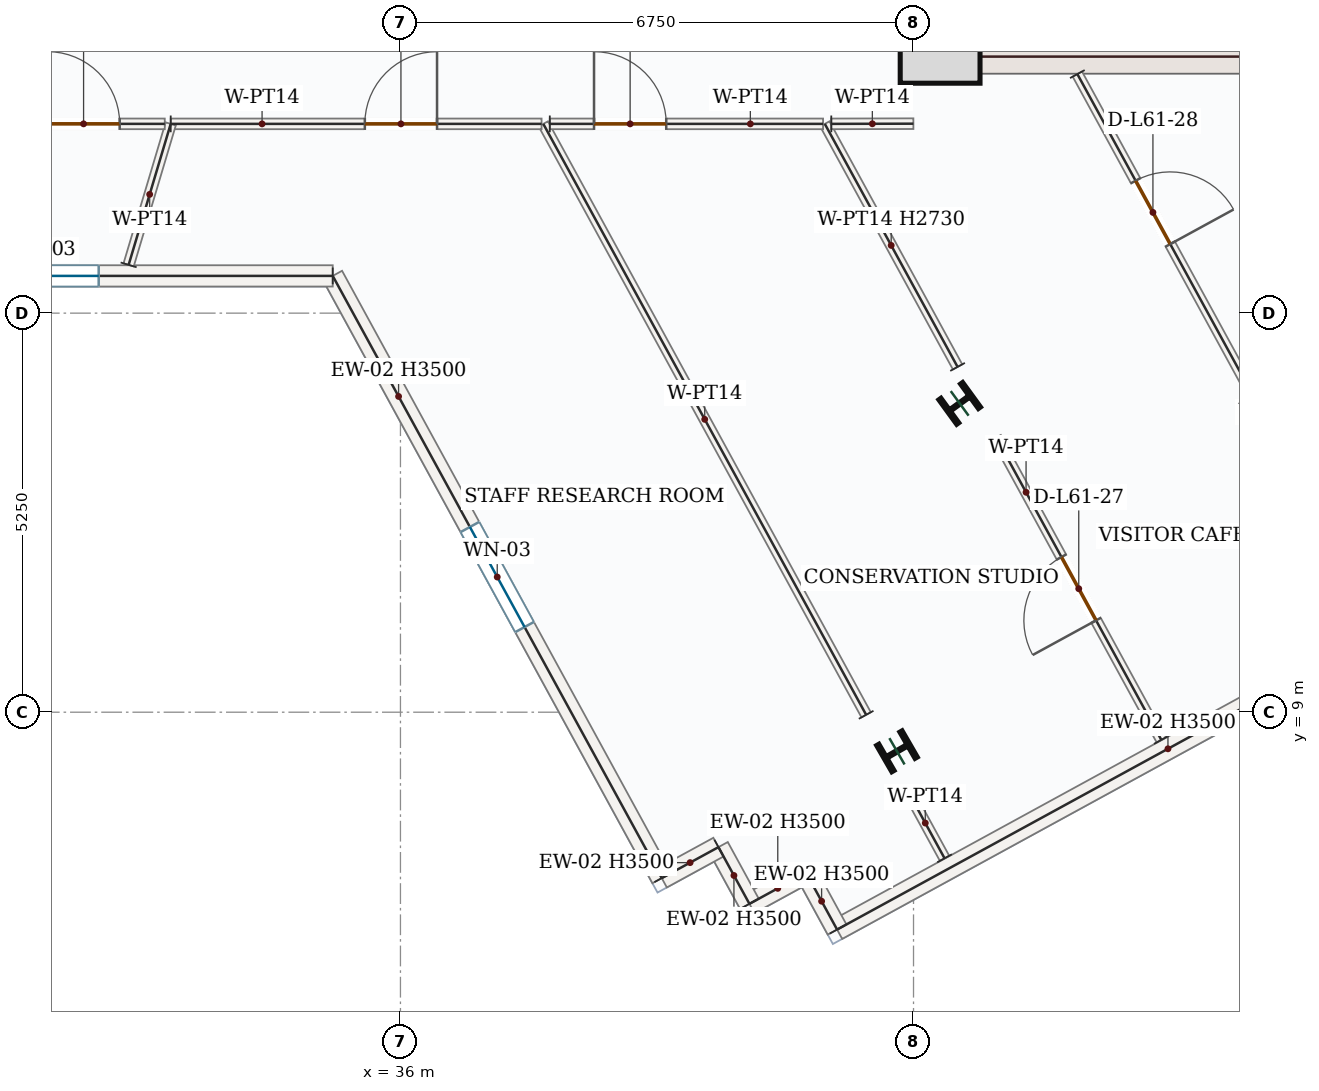
"""IFC4 building model, lengths in metres.
Left out: names, types, materials, properties, quantities, classifications, styles, units other than length and angle.
Written with IfcOpenShell. Run it as: python <this file> out.ifc"""

import sys

from ifc_helpers import new_model, si_unit, direction, frame, frame_2d, origin, origin_2d, place, context, subcontext, project, spatial, rectangle, i_section, extrude, source, transform, mapped, element, fill, save


model = new_model("IFC4")
c1 = context("Model", 3, precision=1e-05, world=origin(), true_north=direction((0.0, 1.0)))
c2 = subcontext(c1, "Body", "Model", "MODEL_VIEW")
j1 = project(units=[si_unit("LENGTHUNIT", "METRE"), si_unit("PLANEANGLEUNIT", "RADIAN")], contexts=[c1])
p1 = place(None, origin())
s1 = spatial("IfcSite", under=j1, at=p1, CompositionType="ELEMENT")
p2 = place(p1, origin())
s2 = spatial("IfcBuilding", under=s1, at=p2, CompositionType="ELEMENT")
p3 = place(p2, frame((0.0, 0.0, 257.85)))
s3 = spatial("IfcBuildingStorey", under=s2, at=p3, CompositionType="ELEMENT", Elevation=257.85)
p4 = place(p3, frame((42.975, 17.4, 0.0), z_axis=(0.0, 0.0, 1.0), x_axis=(0.0, 1.0, 0.0)))
e1 = element("IfcWall", 1, at=p4, inside=s3, PredefinedType="SHEAR", context=c2, shape_type="SweptSolid", body=[
    extrude(rectangle(XDim=8.55, YDim=0.45, at=frame_2d((4.275, 0.0))), origin(), (0.0, 0.0, 1.0), 3.5),
])
p5 = place(p4, frame((6.65, 0.0, 0.0)))
e2 = element("IfcOpeningElement", 2, at=p5, cuts=e1, PredefinedType="OPENING", context=c2, shape_type="SweptSolid", body=[
    extrude(rectangle(XDim=1.1, YDim=2.2, at=frame_2d((0.55, 1.1))), frame((0.0, 0.235, 0.0), z_axis=(0.0, -1.0, 0.0), x_axis=(1.0, 0.0, 0.0)), (0.0, 0.0, 1.0), 0.47),
])
p6 = place(p4, frame((1.75, 0.0, 0.0)))
e3 = element("IfcOpeningElement", 3, at=p6, cuts=e1, PredefinedType="OPENING", context=c2, shape_type="SweptSolid", body=[
    extrude(rectangle(XDim=1.3, YDim=2.2, at=frame_2d((0.65, 1.1))), frame((0.0, 0.235, 0.0), z_axis=(0.0, -1.0, 0.0), x_axis=(1.0, 0.0, 0.0)), (0.0, 0.0, 1.0), 0.47),
])
p7 = place(p4, frame((4.55, 0.0, 0.0)))
e4 = element("IfcOpeningElement", 4, at=p7, cuts=e1, PredefinedType="OPENING", context=c2, shape_type="SweptSolid", body=[
    extrude(rectangle(XDim=0.88, YDim=2.1, at=frame_2d((0.44, 1.05))), frame((0.0, 0.235, 0.0), z_axis=(0.0, -1.0, 0.0), x_axis=(1.0, 0.0, 0.0)), (0.0, 0.0, 1.0), 0.47),
])
m1 = source(origin(), c2, "Body", "SweptSolid", [
    extrude(rectangle(XDim=7.1, YDim=0.45, at=frame_2d((3.55, 0.0))), origin(), (0.0, 0.0, 1.0), 3.5),
])
p8 = place(p3, frame((43.2, 17.625, 0.0), z_axis=(0.0, 0.0, 1.0), x_axis=(1.0, 0.0, 0.0)))
e5 = element("IfcWall", 5, at=p8, inside=s3, PredefinedType="SHEAR", context=c2, shape_type="MappedRepresentation", body=[
    mapped(m1, transform((0.0, 0.0, 0.0), x_axis=(1.0, 0.0, 0.0), y_axis=(0.0, 1.0, 0.0), z_axis=(0.0, 0.0, 1.0), scale=1.0)),
])
m2 = source(origin(), c2, "Body", "SweptSolid", [
    extrude(rectangle(XDim=1.05, YDim=1.05, at=origin_2d()), origin(), (0.0, 0.0, 1.0), 3.75),
])
p9 = place(p3, frame((43.1, 17.8, 0.0), z_axis=(0.0, 0.0, 1.0), x_axis=(1.0, 0.0, 0.0)))
e6 = element("IfcColumn", 6, at=p9, inside=s3, PredefinedType="COLUMN", context=c2, shape_type="MappedRepresentation", body=[
    mapped(m2, transform((0.0, 0.0, 0.0), x_axis=(1.0, 0.0, 0.0), y_axis=(0.0, 1.0, 0.0), z_axis=(0.0, 0.0, 1.0), scale=1.0)),
])
m3 = source(origin(), c2, "Body", "SweptSolid", [
    extrude(i_section(OverallWidth=0.399, OverallDepth=0.386, WebThickness=0.021, FlangeThickness=0.033, FilletRadius=0.018, at=origin_2d()), origin(), (0.0, 0.0, 1.0), 3.75),
])
for number, where, z_axis, x_axis in (
    (7, (43.357, 13.063, 0.0), (0.0, 0.0, 1.0), (-0.588, 0.809, 0.0)),
    (8, (42.532, 8.486, 0.0), (0.0, 0.0, 1.0), (-0.5, 0.866, 0.0)),
):
    element("IfcColumn", number, at=place(p3, frame(where, z_axis=z_axis, x_axis=x_axis)), inside=s3, PredefinedType="COLUMN", context=c2, shape_type="MappedRepresentation", body=[
        mapped(m3, transform((0.0, 0.0, 0.0), x_axis=(1.0, 0.0, 0.0), y_axis=(0.0, 1.0, 0.0), z_axis=(0.0, 0.0, 1.0), scale=1.0)),
    ])
m4 = source(origin(), c2, "Body", "SweptSolid", [
    extrude(rectangle(XDim=9.92, YDim=0.28, at=frame_2d((4.96, 0.0))), origin(), (0.0, 0.0, 1.0), 3.5),
])
p10 = place(p3, frame((50.45, 10.896, 0.0), z_axis=(0.0, 0.0, 1.0), x_axis=(-0.877572768104, -0.479443465574, 0.0)))
e9 = element("IfcWall", 9, at=p10, inside=s3, PredefinedType="SOLIDWALL", context=c2, shape_type="MappedRepresentation", body=[
    mapped(m4, transform((0.0, 0.0, 0.0), x_axis=(1.0, 0.0, 0.0), y_axis=(0.0, 1.0, 0.0), z_axis=(0.0, 0.0, 1.0), scale=1.0)),
])
m5 = source(origin(), c2, "Body", "SweptSolid", [
    extrude(rectangle(XDim=0.85, YDim=0.28, at=frame_2d((0.425, 0.0))), origin(), (0.0, 0.0, 1.0), 3.5),
])
for number, where, z_axis, x_axis in (
    (10, (41.745, 6.14, 0.0), (0.0, 0.0, 1.0), (-0.479, 0.878, 0.0)),
    (11, (41.337, 6.886, 0.0), (0.0, 0.0, 1.0), (-0.878, -0.479, 0.0)),
):
    element("IfcWall", number, at=place(p3, frame(where, z_axis=z_axis, x_axis=x_axis)), inside=s3, PredefinedType="SOLIDWALL", context=c2, shape_type="MappedRepresentation", body=[
        mapped(m5, transform((0.0, 0.0, 0.0), x_axis=(1.0, 0.0, 0.0), y_axis=(0.0, 1.0, 0.0), z_axis=(0.0, 0.0, 1.0), scale=1.0)),
    ])
m6 = source(origin(), c2, "Body", "SweptSolid", [
    extrude(rectangle(XDim=0.85, YDim=0.28, at=frame_2d((0.425, 0.0))), origin(), (0.0, 0.0, 1.0), 3.5),
])
p11 = place(p3, frame((40.591, 6.479, 0.0), z_axis=(0.0, 0.0, 1.0), x_axis=(-0.479656876283, 0.877456141943, 0.0)))
e12 = element("IfcWall", 12, at=p11, inside=s3, PredefinedType="SOLIDWALL", context=c2, shape_type="MappedRepresentation", body=[
    mapped(m6, transform((0.0, 0.0, 0.0), x_axis=(1.0, 0.0, 0.0), y_axis=(0.0, 1.0, 0.0), z_axis=(0.0, 0.0, 1.0), scale=1.0)),
])
p12 = place(p3, frame((40.184, 7.225, 0.0), z_axis=(0.0, 0.0, 1.0), x_axis=(-0.877577015132, -0.479435691737, 0.0)))
e13 = element("IfcWall", 13, at=p12, inside=s3, PredefinedType="SOLIDWALL", context=c2, shape_type="MappedRepresentation", body=[
    mapped(m5, transform((0.0, 0.0, 0.0), x_axis=(1.0, 0.0, 0.0), y_axis=(0.0, 1.0, 0.0), z_axis=(0.0, 0.0, 1.0), scale=1.0)),
])
p13 = place(p3, frame((39.438, 6.817, 0.0), z_axis=(0.0, 0.0, 1.0), x_axis=(-0.479475345647, 0.877555350344, 0.0)))
e14 = element("IfcWall", 14, at=p13, inside=s3, PredefinedType="SOLIDWALL", context=c2, shape_type="SweptSolid", body=[
    extrude(rectangle(XDim=9.028, YDim=0.28, at=frame_2d((4.514, 0.0))), origin(), (0.0, 0.0, 1.0), 3.5),
])
p14 = place(p13, frame((3.764, 0.0, 0.85)))
e15 = element("IfcOpeningElement", 15, at=p14, cuts=e14, PredefinedType="OPENING", context=c2, shape_type="SweptSolid", body=[
    extrude(rectangle(XDim=1.5, YDim=1.5, at=frame_2d((0.75, 0.75))), frame((0.0, 0.15, 0.0), z_axis=(0.0, -1.0, 0.0), x_axis=(1.0, 0.0, 0.0)), (0.0, 0.0, 1.0), 0.3),
])
p15 = place(p3, frame((35.109, 14.74, 0.0), z_axis=(0.0, 0.0, 1.0), x_axis=(-1.0, 0.0, 0.0)))
e16 = element("IfcWall", 16, at=p15, inside=s3, PredefinedType="SOLIDWALL", context=c2, shape_type="SweptSolid", body=[
    extrude(rectangle(XDim=7.658, YDim=0.28, at=frame_2d((3.829, 0.0))), origin(), (0.0, 0.0, 1.0), 2.772),
])
p16 = place(p15, frame((3.079, 0.0, 0.85)))
e17 = element("IfcOpeningElement", 17, at=p16, cuts=e16, PredefinedType="OPENING", context=c2, shape_type="SweptSolid", body=[
    extrude(rectangle(XDim=1.5, YDim=1.5, at=frame_2d((0.75, 0.75))), frame((0.0, 0.15, 0.0), z_axis=(0.0, -1.0, 0.0), x_axis=(1.0, 0.0, 0.0)), (0.0, 0.0, 1.0), 0.3),
])
p17 = place(p3, frame((44.906, 17.395, 0.0), z_axis=(0.0, 0.0, 1.0), x_axis=(0.479449534835, -0.877569452264, 0.0)))
e18 = element("IfcWall", 18, at=p17, inside=s3, PredefinedType="PARTITIONING", context=c2, shape_type="SweptSolid", body=[
    extrude(rectangle(XDim=8.216, YDim=0.14, at=frame_2d((4.108, 0.0))), origin(), (0.0, 0.0, 1.0), 3.5),
])
p18 = place(p17, frame((1.599, 0.0, 0.0)))
e19 = element("IfcOpeningElement", 19, at=p18, cuts=e18, PredefinedType="OPENING", context=c2, shape_type="SweptSolid", body=[
    extrude(rectangle(XDim=0.95, YDim=2.15, at=frame_2d((0.475, 1.075))), frame((0.0, 0.08, 0.0), z_axis=(0.0, -1.0, 0.0), x_axis=(1.0, 0.0, 0.0)), (0.0, 0.0, 1.0), 0.16),
])
p19 = place(p3, frame((46.01, 8.636, 0.0), z_axis=(0.0, 0.0, 1.0), x_axis=(-0.479410597023, 0.877590724348, 0.0)))
e20 = element("IfcWall", 20, at=p19, inside=s3, PredefinedType="PARTITIONING", context=c2, shape_type="SweptSolid", body=[
    extrude(rectangle(XDim=4.532, YDim=0.14, at=frame_2d((2.266, 0.0))), origin(), (0.0, 0.0, 1.0), 3.5),
])
p20 = place(p19, frame((1.791, 0.0, 0.0)))
e21 = element("IfcOpeningElement", 21, at=p20, cuts=e20, PredefinedType="OPENING", context=c2, shape_type="SweptSolid", body=[
    extrude(rectangle(XDim=0.95, YDim=2.15, at=frame_2d((0.475, 1.075))), frame((0.0, 0.08, 0.0), z_axis=(0.0, -1.0, 0.0), x_axis=(1.0, 0.0, 0.0)), (0.0, 0.0, 1.0), 0.16),
])
m7 = source(origin(), c2, "Body", "SweptSolid", [
    extrude(rectangle(XDim=3.643, YDim=0.14, at=frame_2d((1.822, 0.0))), origin(), (0.0, 0.0, 1.0), 2.73),
])
p21 = place(p3, frame((43.33, 13.543, 0.0), z_axis=(0.0, 0.0, 1.0), x_axis=(-0.479434255723, 0.87757779965, 0.0)))
e22 = element("IfcWall", 22, at=p21, inside=s3, PredefinedType="PARTITIONING", context=c2, shape_type="MappedRepresentation", body=[
    mapped(m7, transform((0.0, 0.0, 0.0), x_axis=(1.0, 0.0, 0.0), y_axis=(0.0, 1.0, 0.0), z_axis=(0.0, 0.0, 1.0), scale=1.0)),
])
m8 = source(origin(), c2, "Body", "SweptSolid", [
    extrude(rectangle(XDim=1.08, YDim=0.14, at=frame_2d((0.54, 0.0))), origin(), (0.0, 0.0, 1.0), 3.5),
])
p22 = place(p3, frame((41.668, 16.74, 0.0), z_axis=(0.0, 0.0, 1.0), x_axis=(0.999996908828, 0.002486429927, 0.0)))
e23 = element("IfcWall", 23, at=p22, inside=s3, PredefinedType="PARTITIONING", context=c2, shape_type="MappedRepresentation", body=[
    mapped(m8, transform((0.0, 0.0, 0.0), x_axis=(1.0, 0.0, 0.0), y_axis=(0.0, 1.0, 0.0), z_axis=(0.0, 0.0, 1.0), scale=1.0)),
])
m9 = source(origin(), c2, "Body", "SweptSolid", [
    extrude(rectangle(XDim=8.859, YDim=0.14, at=frame_2d((4.429, 0.0))), origin(), (0.0, 0.0, 1.0), 3.5),
])
p23 = place(p3, frame((42.127, 8.966, 0.0), z_axis=(0.0, 0.0, 1.0), x_axis=(-0.479448669569, 0.877569924991, 0.0)))
e24 = element("IfcWall", 24, at=p23, inside=s3, PredefinedType="PARTITIONING", context=c2, shape_type="MappedRepresentation", body=[
    mapped(m9, transform((0.0, 0.0, 0.0), x_axis=(1.0, 0.0, 0.0), y_axis=(0.0, 1.0, 0.0), z_axis=(0.0, 0.0, 1.0), scale=1.0)),
])
p24 = place(p3, frame((37.965, 16.74, 0.0), z_axis=(0.0, 0.0, 1.0), x_axis=(1.0, 0.0, 0.0)))
e25 = element("IfcWall", 25, at=p24, inside=s3, PredefinedType="PARTITIONING", context=c2, shape_type="SweptSolid", body=[
    extrude(rectangle(XDim=3.595, YDim=0.14, at=frame_2d((1.798, 0.0))), origin(), (0.0, 0.0, 1.0), 3.5),
])
p25 = place(p24, frame((0.582, 0.0, 0.0)))
e26 = element("IfcOpeningElement", 26, at=p25, cuts=e25, PredefinedType="OPENING", context=c2, shape_type="SweptSolid", body=[
    extrude(rectangle(XDim=0.95, YDim=2.15, at=frame_2d((0.475, 1.075))), frame((0.0, 0.08, 0.0), z_axis=(0.0, -1.0, 0.0), x_axis=(1.0, 0.0, 0.0)), (0.0, 0.0, 1.0), 0.16),
])
m10 = source(origin(), c2, "Body", "SweptSolid", [
    extrude(rectangle(XDim=1.057, YDim=0.14, at=frame_2d((0.529, 0.0))), origin(), (0.0, 0.0, 1.0), 3.5),
])
p26 = place(p3, frame((43.158, 7.078, 0.0), z_axis=(0.0, 0.0, 1.0), x_axis=(-0.479434527366, 0.877577651248, 0.0)))
e27 = element("IfcWall", 27, at=p26, inside=s3, PredefinedType="PARTITIONING", context=c2, shape_type="MappedRepresentation", body=[
    mapped(m10, transform((0.0, 0.0, 0.0), x_axis=(1.0, 0.0, 0.0), y_axis=(0.0, 1.0, 0.0), z_axis=(0.0, 0.0, 1.0), scale=1.0)),
])
p27 = place(p3, frame((32.978, 16.74, 0.0), z_axis=(0.0, 0.0, 1.0), x_axis=(1.0, 0.0, 0.0)))
e28 = element("IfcWall", 28, at=p27, inside=s3, PredefinedType="PARTITIONING", context=c2, shape_type="SweptSolid", body=[
    extrude(rectangle(XDim=4.879, YDim=0.14, at=frame_2d((2.439, 0.0))), origin(), (0.0, 0.0, 1.0), 3.5),
])
p28 = place(p27, frame((2.554, 0.0, 0.0)))
e29 = element("IfcOpeningElement", 29, at=p28, cuts=e28, PredefinedType="OPENING", context=c2, shape_type="SweptSolid", body=[
    extrude(rectangle(XDim=0.95, YDim=2.15, at=frame_2d((0.475, 1.075))), frame((0.0, 0.08, 0.0), z_axis=(0.0, -1.0, 0.0), x_axis=(1.0, 0.0, 0.0)), (0.0, 0.0, 1.0), 0.16),
])
m11 = source(origin(), c2, "Body", "SweptSolid", [
    extrude(rectangle(XDim=1.936, YDim=0.14, at=frame_2d((0.968, 0.0))), origin(), (0.0, 0.0, 1.0), 3.5),
])
p29 = place(p3, frame((32.424, 14.885, 0.0), z_axis=(0.0, 0.0, 1.0), x_axis=(0.286028613148, 0.958221077028, 0.0)))
e30 = element("IfcWall", 30, at=p29, inside=s3, PredefinedType="PARTITIONING", context=c2, shape_type="MappedRepresentation", body=[
    mapped(m11, transform((0.0, 0.0, 0.0), x_axis=(1.0, 0.0, 0.0), y_axis=(0.0, 1.0, 0.0), z_axis=(0.0, 0.0, 1.0), scale=1.0)),
])
p30 = place(p3, frame((29.253, 16.741, 0.0), z_axis=(0.0, 0.0, 1.0), x_axis=(0.999999943952, -0.000334806463, 0.0)))
e31 = element("IfcWall", 31, at=p30, inside=s3, PredefinedType="PARTITIONING", context=c2, shape_type="SweptSolid", body=[
    extrude(rectangle(XDim=3.646, YDim=0.14, at=frame_2d((1.823, 0.0))), origin(), (0.0, 0.0, 1.0), 3.5),
])
p31 = place(p30, frame((2.103, 0.0, 0.0)))
e32 = element("IfcOpeningElement", 32, at=p31, cuts=e31, PredefinedType="OPENING", context=c2, shape_type="SweptSolid", body=[
    extrude(rectangle(XDim=0.95, YDim=2.15, at=frame_2d((0.475, 1.075))), frame((0.0, 0.08, 0.0), z_axis=(0.0, -1.0, 0.0), x_axis=(1.0, 0.0, 0.0)), (0.0, 0.0, 1.0), 0.16),
])
m12 = source(origin(), c2, "Body", "SweptSolid", [
    extrude(rectangle(XDim=1.5, YDim=1.5, at=frame_2d((0.75, 0.75))), frame((0.0, 0.03, 0.0), z_axis=(0.0, -1.0, 0.0), x_axis=(1.0, 0.0, 0.0)), (0.0, 0.0, 1.0), 0.06),
])
p32 = place(p14, origin())
e33 = element("IfcWindow", 33, at=p32, inside=s3, PartitioningType="SINGLE_PANEL", PredefinedType="WINDOW", context=c2, shape_type="MappedRepresentation", body=[
    mapped(m12, transform((0.0, 0.0, 0.0), x_axis=(1.0, 0.0, 0.0), y_axis=(0.0, 1.0, 0.0), z_axis=(0.0, 0.0, 1.0), scale=1.0)),
])
fill(e15, e33)
p33 = place(p16, origin())
e34 = element("IfcWindow", 34, at=p33, inside=s3, PartitioningType="SINGLE_PANEL", PredefinedType="WINDOW", context=c2, shape_type="MappedRepresentation", body=[
    mapped(m12, transform((0.0, 0.0, 0.0), x_axis=(1.0, 0.0, 0.0), y_axis=(0.0, 1.0, 0.0), z_axis=(0.0, 0.0, 1.0), scale=1.0)),
])
fill(e17, e34)
m13 = source(origin(), c2, "Body", "SweptSolid", [
    extrude(rectangle(XDim=0.95, YDim=2.15, at=frame_2d((0.475, 1.075))), frame((0.0, 0.025, 0.0), z_axis=(0.0, -1.0, 0.0), x_axis=(1.0, 0.0, 0.0)), (0.0, 0.0, 1.0), 0.05),
])
p34 = place(p31, origin())
e35 = element("IfcDoor", 35, at=p34, inside=s3, OperationType="SINGLE_SWING_LEFT", PredefinedType="DOOR", context=c2, shape_type="MappedRepresentation", body=[
    mapped(m13, transform((0.0, 0.0, 0.0), x_axis=(1.0, 0.0, 0.0), y_axis=(0.0, 1.0, 0.0), z_axis=(0.0, 0.0, 1.0), scale=1.0)),
])
fill(e32, e35)
p35 = place(p28, origin())
e36 = element("IfcDoor", 36, at=p35, inside=s3, OperationType="SINGLE_SWING_RIGHT", PredefinedType="DOOR", context=c2, shape_type="MappedRepresentation", body=[
    mapped(m13, transform((0.0, 0.0, 0.0), x_axis=(1.0, 0.0, 0.0), y_axis=(0.0, 1.0, 0.0), z_axis=(0.0, 0.0, 1.0), scale=1.0)),
])
fill(e29, e36)
p36 = place(p25, origin())
e37 = element("IfcDoor", 37, at=p36, inside=s3, OperationType="SINGLE_SWING_LEFT", PredefinedType="DOOR", context=c2, shape_type="MappedRepresentation", body=[
    mapped(m13, transform((0.0, 0.0, 0.0), x_axis=(1.0, 0.0, 0.0), y_axis=(0.0, 1.0, 0.0), z_axis=(0.0, 0.0, 1.0), scale=1.0)),
])
fill(e26, e37)
p37 = place(p20, origin())
e38 = element("IfcDoor", 38, at=p37, inside=s3, OperationType="SINGLE_SWING_LEFT", PredefinedType="DOOR", context=c2, shape_type="MappedRepresentation", body=[
    mapped(m13, transform((0.0, 0.0, 0.0), x_axis=(1.0, 0.0, 0.0), y_axis=(0.0, 1.0, 0.0), z_axis=(0.0, 0.0, 1.0), scale=1.0)),
])
fill(e21, e38)
p38 = place(p18, origin())
e39 = element("IfcDoor", 39, at=p38, inside=s3, OperationType="SINGLE_SWING_RIGHT", PredefinedType="DOOR", context=c2, shape_type="MappedRepresentation", body=[
    mapped(m13, transform((0.0, 0.0, 0.0), x_axis=(1.0, 0.0, 0.0), y_axis=(0.0, 1.0, 0.0), z_axis=(0.0, 0.0, 1.0), scale=1.0)),
])
fill(e19, e39)
save(model, sys.argv[1])
